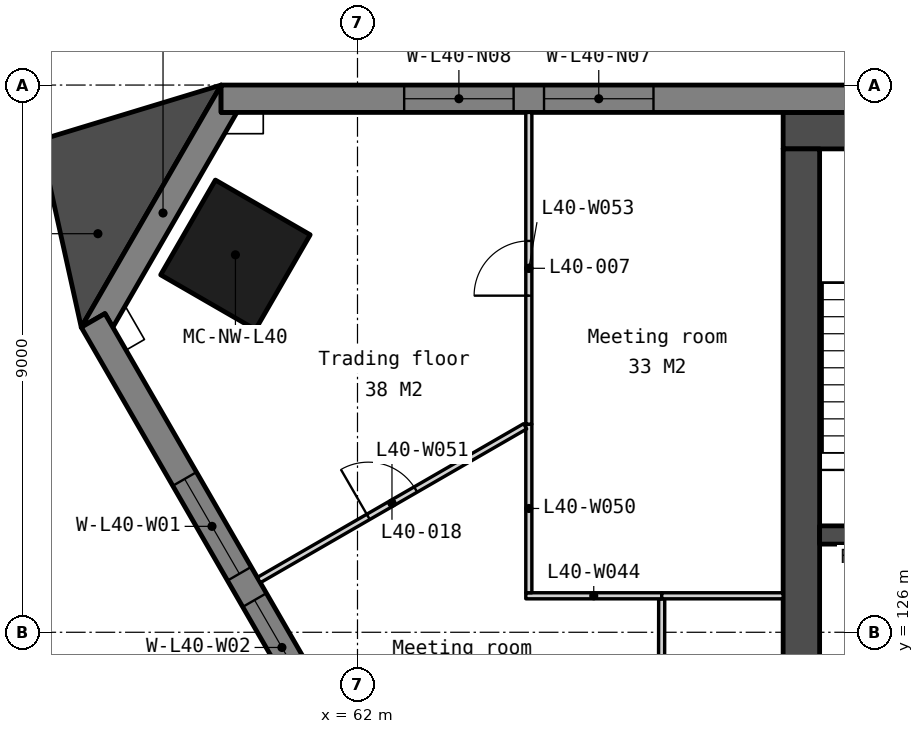
"""IFC4 building model, lengths in metres.
Left out: names, types, materials, properties, quantities, classifications, styles, units other than length and angle.
Written with IfcOpenShell. Run it as: python <this file> out.ifc"""

import sys

from ifc_helpers import new_model, si_unit, direction, frame, frame_2d, origin, origin_2d, place, context, subcontext, project, spatial, polyline, rectangle, outline, extrude, element, fill, save


model = new_model("IFC4")
c1 = context("Model", 3, precision=1e-05, world=origin(), true_north=direction((0.0, 1.0)))
c2 = subcontext(c1, "Body", "Model", "MODEL_VIEW")
j1 = project(units=[si_unit("LENGTHUNIT", "METRE"), si_unit("PLANEANGLEUNIT", "RADIAN")], contexts=[c1])
p1 = place(None, origin())
s1 = spatial("IfcSite", under=j1, at=p1, CompositionType="ELEMENT")
p2 = place(p1, origin())
s2 = spatial("IfcBuilding", under=s1, at=p2, CompositionType="ELEMENT")
p3 = place(p2, frame((0.0, 0.0, 159.8)))
s3 = spatial("IfcBuildingStorey", under=s2, at=p3, CompositionType="ELEMENT", Elevation=159.8)
p4 = place(p3, frame((59.993, 132.208, 0.0), z_axis=(0.0, 0.0, 1.0), x_axis=(-0.5, -0.866025403784, 0.0)))
e1 = element("IfcColumn", 1, at=p4, inside=s3, PredefinedType="COLUMN", context=c2, shape_type="SweptSolid", body=[
    extrude(rectangle(XDim=1.8, YDim=1.8, at=origin_2d()), origin(), (0.0, 0.0, 1.0), 3.9),
])
p5 = place(p3, frame((69.0, 134.25, 0.0), z_axis=(0.0, 0.0, 1.0), x_axis=(1.0, 0.0, 0.0)))
e2 = element("IfcWall", 2, at=p5, inside=s3, PredefinedType="SOLIDWALL", context=c2, shape_type="SweptSolid", body=[
    extrude(rectangle(XDim=22.0, YDim=0.6, at=frame_2d((11.0, 0.0))), origin(), (0.0, 0.0, 1.0), 3.75),
])
p6 = place(p3, frame((69.3, 133.95, 0.0), z_axis=(0.0, 0.0, 1.0), x_axis=(0.0, -1.0, 0.0)))
e3 = element("IfcWall", 3, at=p6, inside=s3, PredefinedType="SOLIDWALL", context=c2, shape_type="SweptSolid", body=[
    extrude(rectangle(XDim=10.8, YDim=0.6, at=frame_2d((5.4, 0.0))), origin(), (0.0, 0.0, 1.0), 3.75),
])
p7 = place(p3, frame((69.6, 127.6, 0.0), z_axis=(0.0, 0.0, 1.0), x_axis=(1.0, 0.0, 0.0)))
e4 = element("IfcWall", 4, at=p7, inside=s3, PredefinedType="SOLIDWALL", context=c2, shape_type="SweptSolid", body=[
    extrude(rectangle(XDim=2.55, YDim=0.3, at=frame_2d((1.275, 0.0))), origin(), (0.0, 0.0, 1.0), 3.75),
])
p8 = place(p3, frame((0.0, 0.0, -0.15)))
e5 = element("IfcWall", 5, at=p8, inside=s3, PredefinedType="SOLIDWALL", context=c2, shape_type="SweptSolid", body=[
    extrude(outline(polyline([(59.757, 135.0), (59.757, 134.55), (60.017, 134.55), (57.977, 131.016), (57.847, 131.241), (57.457, 131.016), (59.757, 135.0)])), origin(), (0.0, 0.0, 1.0), 3.9),
])
p9 = place(p3, frame((100.243, 134.775, -0.15), z_axis=(0.0, 0.0, 1.0), x_axis=(-1.0, 0.0, 0.0)))
e6 = element("IfcWall", 6, at=p9, inside=s3, PredefinedType="SOLIDWALL", context=c2, shape_type="SweptSolid", body=[
    extrude(outline(polyline([(40.486, 0.0), (40.486, 3.9), (0.0, 3.9), (0.0, 0.0), (40.486, 0.0)])), frame((0.0, 0.225, 0.0), z_axis=(0.0, -1.0, 0.0), x_axis=(1.0, 0.0, 0.0)), (0.0, 0.0, 1.0), 0.45),
])
p10 = place(p9, frame((3.011, 0.0, 0.95)))
e7 = element("IfcOpeningElement", 7, at=p10, cuts=e6, PredefinedType="OPENING", context=c2, shape_type="SweptSolid", body=[
    extrude(rectangle(XDim=1.8, YDim=2.2, at=frame_2d((0.9, 1.1))), frame((0.0, 0.235, 0.0), z_axis=(0.0, -1.0, 0.0), x_axis=(1.0, 0.0, 0.0)), (0.0, 0.0, 1.0), 0.47),
])
p11 = place(p9, frame((5.311, 0.0, 0.95)))
e8 = element("IfcOpeningElement", 8, at=p11, cuts=e6, PredefinedType="OPENING", context=c2, shape_type="SweptSolid", body=[
    extrude(rectangle(XDim=1.8, YDim=2.2, at=frame_2d((0.9, 1.1))), frame((0.0, 0.235, 0.0), z_axis=(0.0, -1.0, 0.0), x_axis=(1.0, 0.0, 0.0)), (0.0, 0.0, 1.0), 0.47),
])
p12 = place(p9, frame((13.132, 0.0, 0.95)))
e9 = element("IfcOpeningElement", 9, at=p12, cuts=e6, PredefinedType="OPENING", context=c2, shape_type="SweptSolid", body=[
    extrude(rectangle(XDim=1.8, YDim=2.2, at=frame_2d((0.9, 1.1))), frame((0.0, 0.235, 0.0), z_axis=(0.0, -1.0, 0.0), x_axis=(1.0, 0.0, 0.0)), (0.0, 0.0, 1.0), 0.47),
])
p13 = place(p9, frame((15.432, 0.0, 0.95)))
e10 = element("IfcOpeningElement", 10, at=p13, cuts=e6, PredefinedType="OPENING", context=c2, shape_type="SweptSolid", body=[
    extrude(rectangle(XDim=1.8, YDim=2.2, at=frame_2d((0.9, 1.1))), frame((0.0, 0.235, 0.0), z_axis=(0.0, -1.0, 0.0), x_axis=(1.0, 0.0, 0.0)), (0.0, 0.0, 1.0), 0.47),
])
p14 = place(p9, frame((23.254, 0.0, 0.95)))
e11 = element("IfcOpeningElement", 11, at=p14, cuts=e6, PredefinedType="OPENING", context=c2, shape_type="SweptSolid", body=[
    extrude(rectangle(XDim=1.8, YDim=2.2, at=frame_2d((0.9, 1.1))), frame((0.0, 0.235, 0.0), z_axis=(0.0, -1.0, 0.0), x_axis=(1.0, 0.0, 0.0)), (0.0, 0.0, 1.0), 0.47),
])
p15 = place(p9, frame((25.554, 0.0, 0.95)))
e12 = element("IfcOpeningElement", 12, at=p15, cuts=e6, PredefinedType="OPENING", context=c2, shape_type="SweptSolid", body=[
    extrude(rectangle(XDim=1.8, YDim=2.2, at=frame_2d((0.9, 1.1))), frame((0.0, 0.235, 0.0), z_axis=(0.0, -1.0, 0.0), x_axis=(1.0, 0.0, 0.0)), (0.0, 0.0, 1.0), 0.47),
])
p16 = place(p9, frame((33.375, 0.0, 0.95)))
e13 = element("IfcOpeningElement", 13, at=p16, cuts=e6, PredefinedType="OPENING", context=c2, shape_type="SweptSolid", body=[
    extrude(rectangle(XDim=1.8, YDim=2.2, at=frame_2d((0.9, 1.1))), frame((0.0, 0.235, 0.0), z_axis=(0.0, -1.0, 0.0), x_axis=(1.0, 0.0, 0.0)), (0.0, 0.0, 1.0), 0.47),
])
p17 = place(p9, frame((35.675, 0.0, 0.95)))
e14 = element("IfcOpeningElement", 14, at=p17, cuts=e6, PredefinedType="OPENING", context=c2, shape_type="SweptSolid", body=[
    extrude(rectangle(XDim=1.8, YDim=2.2, at=frame_2d((0.9, 1.1))), frame((0.0, 0.235, 0.0), z_axis=(0.0, -1.0, 0.0), x_axis=(1.0, 0.0, 0.0)), (0.0, 0.0, 1.0), 0.47),
])
p18 = place(p3, frame((57.652, 131.129, -0.15), z_axis=(0.0, 0.0, 1.0), x_axis=(0.499997369791, -0.866026922331, 0.0)))
e15 = element("IfcWall", 15, at=p18, inside=s3, PredefinedType="SOLIDWALL", context=c2, shape_type="SweptSolid", body=[
    extrude(outline(polyline([(40.486, 0.0), (40.486, 3.9), (0.0, 3.9), (0.0, 0.0), (40.486, 0.0)])), frame((0.0, 0.225, 0.0), z_axis=(0.0, -1.0, 0.0), x_axis=(1.0, 0.0, 0.0)), (0.0, 0.0, 1.0), 0.45),
])
p19 = place(p18, frame((3.011, 0.0, 0.95)))
e16 = element("IfcOpeningElement", 16, at=p19, cuts=e15, PredefinedType="OPENING", context=c2, shape_type="SweptSolid", body=[
    extrude(rectangle(XDim=1.8, YDim=2.2, at=frame_2d((0.9, 1.1))), frame((0.0, 0.235, 0.0), z_axis=(0.0, -1.0, 0.0), x_axis=(1.0, 0.0, 0.0)), (0.0, 0.0, 1.0), 0.47),
])
p20 = place(p18, frame((5.311, 0.0, 0.95)))
e17 = element("IfcOpeningElement", 17, at=p20, cuts=e15, PredefinedType="OPENING", context=c2, shape_type="SweptSolid", body=[
    extrude(rectangle(XDim=1.8, YDim=2.2, at=frame_2d((0.9, 1.1))), frame((0.0, 0.235, 0.0), z_axis=(0.0, -1.0, 0.0), x_axis=(1.0, 0.0, 0.0)), (0.0, 0.0, 1.0), 0.47),
])
p21 = place(p18, frame((13.132, 0.0, 0.95)))
e18 = element("IfcOpeningElement", 18, at=p21, cuts=e15, PredefinedType="OPENING", context=c2, shape_type="SweptSolid", body=[
    extrude(rectangle(XDim=1.8, YDim=2.2, at=frame_2d((0.9, 1.1))), frame((0.0, 0.235, 0.0), z_axis=(0.0, -1.0, 0.0), x_axis=(1.0, 0.0, 0.0)), (0.0, 0.0, 1.0), 0.47),
])
p22 = place(p18, frame((15.432, 0.0, 0.95)))
e19 = element("IfcOpeningElement", 19, at=p22, cuts=e15, PredefinedType="OPENING", context=c2, shape_type="SweptSolid", body=[
    extrude(rectangle(XDim=1.8, YDim=2.2, at=frame_2d((0.9, 1.1))), frame((0.0, 0.235, 0.0), z_axis=(0.0, -1.0, 0.0), x_axis=(1.0, 0.0, 0.0)), (0.0, 0.0, 1.0), 0.47),
])
p23 = place(p18, frame((23.254, 0.0, 0.95)))
e20 = element("IfcOpeningElement", 20, at=p23, cuts=e15, PredefinedType="OPENING", context=c2, shape_type="SweptSolid", body=[
    extrude(rectangle(XDim=1.8, YDim=2.2, at=frame_2d((0.9, 1.1))), frame((0.0, 0.235, 0.0), z_axis=(0.0, -1.0, 0.0), x_axis=(1.0, 0.0, 0.0)), (0.0, 0.0, 1.0), 0.47),
])
p24 = place(p18, frame((25.554, 0.0, 0.95)))
e21 = element("IfcOpeningElement", 21, at=p24, cuts=e15, PredefinedType="OPENING", context=c2, shape_type="SweptSolid", body=[
    extrude(rectangle(XDim=1.8, YDim=2.2, at=frame_2d((0.9, 1.1))), frame((0.0, 0.235, 0.0), z_axis=(0.0, -1.0, 0.0), x_axis=(1.0, 0.0, 0.0)), (0.0, 0.0, 1.0), 0.47),
])
p25 = place(p18, frame((33.375, 0.0, 0.95)))
e22 = element("IfcOpeningElement", 22, at=p25, cuts=e15, PredefinedType="OPENING", context=c2, shape_type="SweptSolid", body=[
    extrude(rectangle(XDim=1.8, YDim=2.2, at=frame_2d((0.9, 1.1))), frame((0.0, 0.235, 0.0), z_axis=(0.0, -1.0, 0.0), x_axis=(1.0, 0.0, 0.0)), (0.0, 0.0, 1.0), 0.47),
])
p26 = place(p18, frame((35.675, 0.0, 0.95)))
e23 = element("IfcOpeningElement", 23, at=p26, cuts=e15, PredefinedType="OPENING", context=c2, shape_type="SweptSolid", body=[
    extrude(rectangle(XDim=1.8, YDim=2.2, at=frame_2d((0.9, 1.1))), frame((0.0, 0.235, 0.0), z_axis=(0.0, -1.0, 0.0), x_axis=(1.0, 0.0, 0.0)), (0.0, 0.0, 1.0), 0.47),
])
p27 = place(p3, frame((0.0, 0.0, -0.15)))
e24 = element("IfcWall", 24, at=p27, inside=s3, PredefinedType="SOLIDWALL", context=c2, shape_type="SweptSolid", body=[
    extrude(outline(polyline([(59.757, 135.0), (56.776, 134.094), (57.457, 131.016), (59.757, 135.0)])), origin(), (0.0, 0.0, 1.0), 3.9),
])
p28 = place(p3, frame((67.0, 124.925, 0.0), z_axis=(0.0, 0.0, 1.0), x_axis=(0.001803152591, 0.999998374319, 0.0)))
e25 = element("IfcWall", 25, at=p28, inside=s3, PredefinedType="PARTITIONING", context=c2, shape_type="SweptSolid", body=[
    extrude(rectangle(XDim=1.625, YDim=0.1, at=frame_2d((0.812, 0.0))), origin(), (0.0, 0.0, 1.0), 3.75),
])
p29 = place(p3, frame((64.768, 126.6, 0.0), z_axis=(0.0, 0.0, 1.0), x_axis=(1.0, 0.0, 0.0)))
e26 = element("IfcWall", 26, at=p29, inside=s3, PredefinedType="PARTITIONING", context=c2, shape_type="SweptSolid", body=[
    extrude(rectangle(XDim=2.235, YDim=0.1, at=frame_2d((1.118, 0.0))), origin(), (0.0, 0.0, 1.0), 3.75),
])
p30 = place(p3, frame((67.003, 126.6, 0.0), z_axis=(0.0, 0.0, 1.0), x_axis=(1.0, 0.0, 0.0)))
e27 = element("IfcWall", 27, at=p30, inside=s3, PredefinedType="PARTITIONING", context=c2, shape_type="SweptSolid", body=[
    extrude(rectangle(XDim=1.997, YDim=0.1, at=frame_2d((0.999, 0.0))), origin(), (0.0, 0.0, 1.0), 3.75),
])
p31 = place(p3, frame((64.818, 126.65, 0.0), z_axis=(0.0, 0.0, 1.0), x_axis=(0.0, 1.0, 0.0)))
e28 = element("IfcWall", 28, at=p31, inside=s3, PredefinedType="PARTITIONING", context=c2, shape_type="SweptSolid", body=[
    extrude(rectangle(XDim=2.772, YDim=0.1, at=frame_2d((1.386, 0.0))), origin(), (0.0, 0.0, 1.0), 3.75),
])
p32 = place(p3, frame((60.377, 126.859, 0.0), z_axis=(0.0, 0.0, 1.0), x_axis=(0.866030444867, 0.499991268487, 0.0)))
e29 = element("IfcWall", 29, at=p32, inside=s3, PredefinedType="PARTITIONING", context=c2, shape_type="SweptSolid", body=[
    extrude(rectangle(XDim=5.058, YDim=0.1, at=frame_2d((2.529, 0.0))), origin(), (0.0, 0.0, 1.0), 3.75),
])
p33 = place(p32, frame((2.079, 0.0, 0.0)))
e30 = element("IfcOpeningElement", 30, at=p33, cuts=e29, PredefinedType="OPENING", context=c2, shape_type="SweptSolid", body=[
    extrude(rectangle(XDim=0.9, YDim=2.1, at=frame_2d((0.45, 1.05))), frame((0.0, 0.06, 0.0), z_axis=(0.0, -1.0, 0.0), x_axis=(1.0, 0.0, 0.0)), (0.0, 0.0, 1.0), 0.12),
])
p34 = place(p3, frame((64.818, 129.422, 0.0), z_axis=(0.0, 0.0, 1.0), x_axis=(0.0, 1.0, 0.0)))
e31 = element("IfcWall", 31, at=p34, inside=s3, PredefinedType="PARTITIONING", context=c2, shape_type="SweptSolid", body=[
    extrude(rectangle(XDim=5.128, YDim=0.1, at=frame_2d((2.564, 0.0))), origin(), (0.0, 0.0, 1.0), 3.75),
])
p35 = place(p34, frame((2.114, 0.0, 0.0)))
e32 = element("IfcOpeningElement", 32, at=p35, cuts=e31, PredefinedType="OPENING", context=c2, shape_type="SweptSolid", body=[
    extrude(rectangle(XDim=0.9, YDim=2.1, at=frame_2d((0.45, 1.05))), frame((0.0, 0.06, 0.0), z_axis=(0.0, -1.0, 0.0), x_axis=(1.0, 0.0, 0.0)), (0.0, 0.0, 1.0), 0.12),
])
p36 = place(p16, origin())
e33 = element("IfcWindow", 33, at=p36, inside=s3, PartitioningType="SINGLE_PANEL", PredefinedType="WINDOW", context=c2, shape_type="SweptSolid", body=[
    extrude(rectangle(XDim=1.8, YDim=2.2, at=frame_2d((0.9, 1.1))), frame((0.0, 0.03, 0.0), z_axis=(0.0, -1.0, 0.0), x_axis=(1.0, 0.0, 0.0)), (0.0, 0.0, 1.0), 0.06),
])
fill(e13, e33)
p37 = place(p17, origin())
e34 = element("IfcWindow", 34, at=p37, inside=s3, PartitioningType="SINGLE_PANEL", PredefinedType="WINDOW", context=c2, shape_type="SweptSolid", body=[
    extrude(rectangle(XDim=1.8, YDim=2.2, at=frame_2d((0.9, 1.1))), frame((0.0, 0.03, 0.0), z_axis=(0.0, -1.0, 0.0), x_axis=(1.0, 0.0, 0.0)), (0.0, 0.0, 1.0), 0.06),
])
fill(e14, e34)
p38 = place(p19, origin())
e35 = element("IfcWindow", 35, at=p38, inside=s3, PartitioningType="SINGLE_PANEL", PredefinedType="WINDOW", context=c2, shape_type="SweptSolid", body=[
    extrude(rectangle(XDim=1.8, YDim=2.2, at=frame_2d((0.9, 1.1))), frame((0.0, 0.03, 0.0), z_axis=(0.0, -1.0, 0.0), x_axis=(1.0, 0.0, 0.0)), (0.0, 0.0, 1.0), 0.06),
])
fill(e16, e35)
p39 = place(p20, origin())
e36 = element("IfcWindow", 36, at=p39, inside=s3, PartitioningType="SINGLE_PANEL", PredefinedType="WINDOW", context=c2, shape_type="SweptSolid", body=[
    extrude(rectangle(XDim=1.8, YDim=2.2, at=frame_2d((0.9, 1.1))), frame((0.0, 0.03, 0.0), z_axis=(0.0, -1.0, 0.0), x_axis=(1.0, 0.0, 0.0)), (0.0, 0.0, 1.0), 0.06),
])
fill(e17, e36)
p40 = place(p35, origin())
e37 = element("IfcDoor", 37, at=p40, inside=s3, OperationType="SINGLE_SWING_LEFT", PredefinedType="DOOR", context=c2, shape_type="SweptSolid", body=[
    extrude(rectangle(XDim=0.9, YDim=2.1, at=frame_2d((0.45, 1.05))), frame((0.0, 0.025, 0.0), z_axis=(0.0, -1.0, 0.0), x_axis=(1.0, 0.0, 0.0)), (0.0, 0.0, 1.0), 0.05),
])
fill(e32, e37)
p41 = place(p33, origin())
e38 = element("IfcDoor", 38, at=p41, inside=s3, OperationType="SINGLE_SWING_LEFT", PredefinedType="DOOR", context=c2, shape_type="SweptSolid", body=[
    extrude(rectangle(XDim=0.9, YDim=2.1, at=frame_2d((0.45, 1.05))), frame((0.0, 0.025, 0.0), z_axis=(0.0, -1.0, 0.0), x_axis=(1.0, 0.0, 0.0)), (0.0, 0.0, 1.0), 0.05),
])
fill(e30, e38)
save(model, sys.argv[1])
